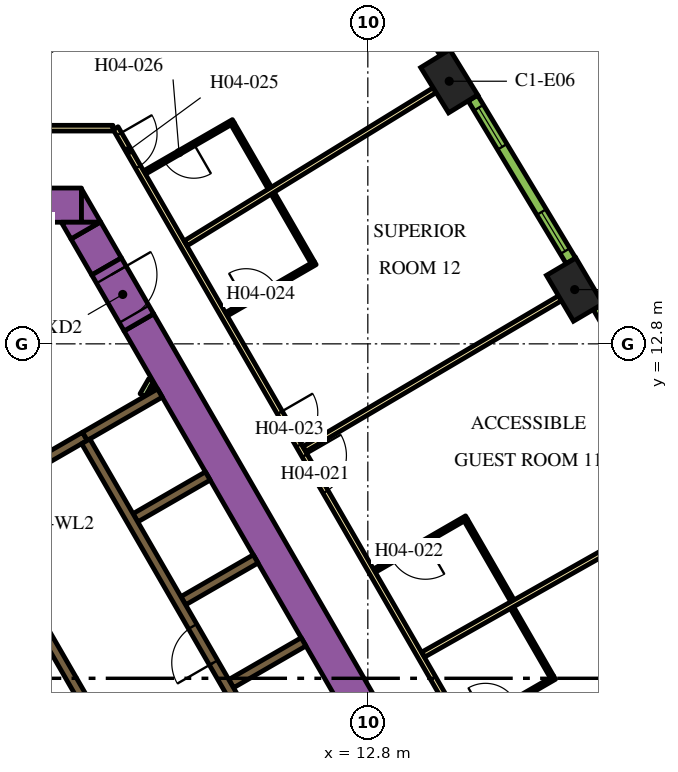
"""IFC4 building model, lengths in metres.
Left out: names, types, materials, properties, quantities, classifications, styles, units other than length and angle.
Written with IfcOpenShell. Run it as: python <this file> out.ifc"""

import sys

from ifc_helpers import new_model, si_unit, direction, frame, frame_2d, origin, origin_2d, place, context, subcontext, project, spatial, polyline, rectangle, outline, extrude, element, fill, save


model = new_model("IFC4")
c1 = context("Model", 3, precision=1e-05, world=origin(), true_north=direction((0.0, 1.0)))
c2 = subcontext(c1, "Body", "Model", "MODEL_VIEW")
j1 = project(units=[si_unit("LENGTHUNIT", "METRE"), si_unit("PLANEANGLEUNIT", "RADIAN")], contexts=[c1])
p1 = place(None, origin())
s1 = spatial("IfcSite", under=j1, at=p1, CompositionType="ELEMENT")
p2 = place(p1, origin())
s2 = spatial("IfcBuilding", under=s1, at=p2, CompositionType="ELEMENT")
p3 = place(p2, frame((0.0, 0.0, 62.7)))
s3 = spatial("IfcBuildingStorey", under=s2, at=p3, CompositionType="ELEMENT", Elevation=62.7)
for number, where, z_axis, x_axis in (
    (1, (18.243, 14.228, 0.0), (0.0, 0.0, 1.0), (-0.508, 0.861, 0.0)),
    (2, (14.942, 19.71, 0.0), (0.0, 0.0, 1.0), (-0.524, 0.852, 0.0)),
):
    element("IfcColumn", number, at=place(p3, frame(where, z_axis=z_axis, x_axis=x_axis)), inside=s3, PredefinedType="COLUMN", context=c2, shape_type="SweptSolid", body=[
        extrude(rectangle(XDim=1.4, YDim=0.9, at=origin_2d()), origin(), (0.0, 0.0, 1.0), 3.9),
    ])
p4 = place(p3, frame((6.776, 13.364, 0.0), z_axis=(0.0, 0.0, 1.0), x_axis=(0.500004177138, -0.8660229921, 0.0)))
e3 = element("IfcWall", 3, at=p4, inside=s3, PredefinedType="SOLIDWALL", context=c2, shape_type="SweptSolid", body=[
    extrude(rectangle(XDim=20.204, YDim=0.9, at=frame_2d((10.102, 0.0))), origin(), (0.0, 0.0, 1.0), 3.9),
])
p5 = place(p3, frame((-4.224, 16.45, 0.0), z_axis=(0.0, 0.0, 1.0), x_axis=(1.0, 0.0, 0.0)))
e4 = element("IfcWall", 4, at=p5, inside=s3, PredefinedType="SOLIDWALL", context=c2, shape_type="SweptSolid", body=[
    extrude(rectangle(XDim=9.488, YDim=0.9, at=frame_2d((4.744, 0.0))), origin(), (0.0, 0.0, 1.0), 3.9),
])
p6 = place(p3, origin())
e5 = element("IfcWall", 5, at=p6, inside=s3, PredefinedType="SOLIDWALL", context=c2, shape_type="SweptSolid", body=[
    extrude(outline(polyline([(5.265, 16.0), (5.265, 16.88), (5.773, 16.0), (5.265, 16.0)])), origin(), (0.0, 0.0, 1.0), 3.9),
])
p7 = place(p3, frame((5.926, 14.836, 0.0), z_axis=(0.0, 0.0, 1.0), x_axis=(-0.500076735116, 0.865981096212, 0.0)))
e6 = element("IfcWall", 6, at=p7, inside=s3, PredefinedType="SOLIDWALL", context=c2, shape_type="SweptSolid", body=[
    extrude(rectangle(XDim=1.094, YDim=0.9, at=frame_2d((0.547, 0.0))), origin(), (0.0, 0.0, 1.0), 3.9),
])
e7 = element("IfcWall", 7, at=p6, inside=s3, PredefinedType="SOLIDWALL", context=c2, shape_type="SweptSolid", body=[
    extrude(outline(polyline([(4.734, 16.0), (5.75, 16.0), (4.988, 15.56), (4.734, 16.0)])), origin(), (0.0, 0.0, 1.0), 3.9),
])
e8 = element("IfcWall", 8, at=p6, inside=s3, PredefinedType="SOLIDWALL", context=c2, shape_type="SweptSolid", body=[
    extrude(outline(polyline([(0.335, 6.925), (0.335, 6.925), (0.335, 7.075), (0.335, 7.075), (0.335, 7.075), (0.245, 7.075), (0.079, 7.363), (0.035, 7.439), (0.252, 7.564), (0.377, 7.348), (6.552, -3.348), (6.677, -3.564), (6.46, -3.689), (4.897, -0.981), (0.332, 6.925), (0.335, 6.925), (0.335, 6.925)])), origin(), (0.0, 0.0, 1.0), 3.9),
])
p8 = place(p3, frame((4.358, 9.791, 0.0), z_axis=(0.0, 0.0, 1.0), x_axis=(0.866079547155, 0.499906209203, 0.0)))
e9 = element("IfcWall", 9, at=p8, inside=s3, PredefinedType="SOLIDWALL", context=c2, shape_type="SweptSolid", body=[
    extrude(rectangle(XDim=1.15, YDim=0.25, at=frame_2d((0.575, 0.0))), origin(), (0.0, 0.0, 1.0), 3.9),
])
p9 = place(p3, frame((5.356, 10.367, 0.0), z_axis=(0.0, 0.0, 1.0), x_axis=(0.865978535641, 0.50008116922, 0.0)))
e10 = element("IfcWall", 10, at=p9, inside=s3, PredefinedType="SOLIDWALL", context=c2, shape_type="SweptSolid", body=[
    extrude(rectangle(XDim=2.278, YDim=0.25, at=frame_2d((1.139, 0.0))), origin(), (0.0, 0.0, 1.0), 3.9),
])
for number, where, z_axis, x_axis in (
    (11, (6.684, 8.224, 0.0), (0.0, 0.0, 1.0), (0.866, 0.5, 0.0)),
    (12, (7.944, 6.041, 0.0), (0.0, 0.0, 1.0), (0.866, 0.5, 0.0)),
    (13, (9.204, 3.859, 0.0), (0.0, 0.0, 1.0), (0.866, 0.5, 0.0)),
):
    element("IfcWall", number, at=place(p3, frame(where, z_axis=z_axis, x_axis=x_axis)), inside=s3, PredefinedType="SOLIDWALL", context=c2, shape_type="SweptSolid", body=[
        extrude(rectangle(XDim=2.2, YDim=0.25, at=frame_2d((1.1, 0.0))), origin(), (0.0, 0.0, 1.0), 3.9),
    ])
p10 = place(p3, frame((6.872, 11.45, 0.0), z_axis=(0.0, 0.0, 1.0), x_axis=(0.499846793097, 0.866113839764, 0.0)))
e14 = element("IfcWall", 14, at=p10, inside=s3, PredefinedType="PARTITIONING", context=c2, shape_type="SweptSolid", body=[
    extrude(rectangle(XDim=0.453, YDim=0.15, at=frame_2d((0.227, 0.0))), origin(), (0.0, 0.0, 1.0), 2.75),
])
p11 = place(p3, frame((7.131, 11.6, 0.0), z_axis=(0.0, 0.0, 1.0), x_axis=(0.498600033135, 0.866832167699, 0.0)))
e15 = element("IfcWall", 15, at=p11, inside=s3, PredefinedType="PARTITIONING", context=c2, shape_type="SweptSolid", body=[
    extrude(rectangle(XDim=0.107, YDim=0.15, at=frame_2d((0.053, 0.0))), origin(), (0.0, 0.0, 1.0), 2.75),
])
p12 = place(p3, frame((11.553, -0.46, 0.0), z_axis=(0.0, 0.0, 1.0), x_axis=(-0.500006514828, 0.866021642414, 0.0)))
e16 = element("IfcWall", 16, at=p12, inside=s3, PredefinedType="SOLIDWALL", context=c2, shape_type="SweptSolid", body=[
    extrude(rectangle(XDim=12.35, YDim=0.25, at=frame_2d((6.175, 0.0))), origin(), (0.0, 0.0, 1.0), 3.9),
])
p13 = place(p12, frame((0.585, 0.0, 0.0)))
e17 = element("IfcOpeningElement", 17, at=p13, cuts=e16, PredefinedType="OPENING", context=c2, shape_type="SweptSolid", body=[
    extrude(rectangle(XDim=1.1, YDim=2.1, at=frame_2d((0.55, 1.05))), frame((0.0, 0.135, 0.0), z_axis=(0.0, -1.0, 0.0), x_axis=(1.0, 0.0, 0.0)), (0.0, 0.0, 1.0), 0.27),
])
p14 = place(p12, frame((3.105, 0.0, 0.0)))
e18 = element("IfcOpeningElement", 18, at=p14, cuts=e16, PredefinedType="OPENING", context=c2, shape_type="SweptSolid", body=[
    extrude(rectangle(XDim=1.1, YDim=2.1, at=frame_2d((0.55, 1.05))), frame((0.0, 0.135, 0.0), z_axis=(0.0, -1.0, 0.0), x_axis=(1.0, 0.0, 0.0)), (0.0, 0.0, 1.0), 0.27),
])
p15 = place(p12, frame((5.625, 0.0, 0.0)))
e19 = element("IfcOpeningElement", 19, at=p15, cuts=e16, PredefinedType="OPENING", context=c2, shape_type="SweptSolid", body=[
    extrude(rectangle(XDim=1.1, YDim=2.1, at=frame_2d((0.55, 1.05))), frame((0.0, 0.135, 0.0), z_axis=(0.0, -1.0, 0.0), x_axis=(1.0, 0.0, 0.0)), (0.0, 0.0, 1.0), 0.27),
])
p16 = place(p3, frame((8.565, -2.185, 0.0), z_axis=(0.0, 0.0, 1.0), x_axis=(-0.499997954832, 0.866026584559, 0.0)))
e20 = element("IfcWall", 20, at=p16, inside=s3, PredefinedType="SOLIDWALL", context=c2, shape_type="SweptSolid", body=[
    extrude(rectangle(XDim=12.35, YDim=0.25, at=frame_2d((6.175, 0.0))), origin(), (0.0, 0.0, 1.0), 3.9),
])
p17 = place(p16, frame((5.725, 0.0, 0.0)))
e21 = element("IfcOpeningElement", 21, at=p17, cuts=e20, PredefinedType="OPENING", context=c2, shape_type="SweptSolid", body=[
    extrude(rectangle(XDim=0.9, YDim=2.1, at=frame_2d((0.45, 1.05))), frame((0.0, 0.135, 0.0), z_axis=(0.0, -1.0, 0.0), x_axis=(1.0, 0.0, 0.0)), (0.0, 0.0, 1.0), 0.27),
])
p18 = place(p3, frame((5.926, 14.836, 0.0), z_axis=(0.0, 0.0, 1.0), x_axis=(0.500062241894, -0.865989465428, 0.0)))
e22 = element("IfcWall", 22, at=p18, inside=s3, PredefinedType="SOLIDWALL", context=c2, shape_type="SweptSolid", body=[
    extrude(rectangle(XDim=1.7, YDim=0.9, at=frame_2d((0.85, 0.0))), origin(), (0.0, 0.0, 1.0), 3.9),
])
p19 = place(p18, frame((0.25, 0.0, 0.0)))
e23 = element("IfcOpeningElement", 23, at=p19, cuts=e22, PredefinedType="OPENING", context=c2, shape_type="SweptSolid", body=[
    extrude(rectangle(XDim=1.2, YDim=2.1, at=frame_2d((0.6, 1.05))), frame((0.0, 0.46, 0.0), z_axis=(0.0, -1.0, 0.0), x_axis=(1.0, 0.0, 0.0)), (0.0, 0.0, 1.0), 0.92),
])
p20 = place(p3, frame((6.163, 18.475, 0.0), z_axis=(0.0, 0.0, 1.0), x_axis=(0.500001317485, -0.866024643133, 0.0)))
e24 = element("IfcWall", 24, at=p20, inside=s3, PredefinedType="PARTITIONING", context=c2, shape_type="SweptSolid", body=[
    extrude(rectangle(XDim=25.767, YDim=0.15, at=frame_2d((12.883, 0.0))), origin(), (0.0, 0.0, 1.0), 2.75),
])
p21 = place(p20, frame((21.138, 0.0, 0.0)))
e25 = element("IfcOpeningElement", 25, at=p21, cuts=e24, PredefinedType="OPENING", context=c2, shape_type="SweptSolid", body=[
    extrude(rectangle(XDim=1.0, YDim=2.1, at=frame_2d((0.5, 1.05))), frame((0.0, 0.085, 0.0), z_axis=(0.0, -1.0, 0.0), x_axis=(1.0, 0.0, 0.0)), (0.0, 0.0, 1.0), 0.17),
])
p22 = place(p20, frame((9.948, 0.0, 0.0)))
e26 = element("IfcOpeningElement", 26, at=p22, cuts=e24, PredefinedType="OPENING", context=c2, shape_type="SweptSolid", body=[
    extrude(rectangle(XDim=1.1, YDim=2.1, at=frame_2d((0.55, 1.05))), frame((0.0, 0.085, 0.0), z_axis=(0.0, -1.0, 0.0), x_axis=(1.0, 0.0, 0.0)), (0.0, 0.0, 1.0), 0.17),
])
p23 = place(p20, frame((8.641, 0.0, 0.0)))
e27 = element("IfcOpeningElement", 27, at=p23, cuts=e24, PredefinedType="OPENING", context=c2, shape_type="SweptSolid", body=[
    extrude(rectangle(XDim=1.0, YDim=2.1, at=frame_2d((0.5, 1.05))), frame((0.0, 0.085, 0.0), z_axis=(0.0, -1.0, 0.0), x_axis=(1.0, 0.0, 0.0)), (0.0, 0.0, 1.0), 0.17),
])
p24 = place(p20, frame((0.18, 0.0, 0.0)))
e28 = element("IfcOpeningElement", 28, at=p24, cuts=e24, PredefinedType="OPENING", context=c2, shape_type="SweptSolid", body=[
    extrude(rectangle(XDim=1.0, YDim=2.1, at=frame_2d((0.5, 1.05))), frame((0.0, 0.085, 0.0), z_axis=(0.0, -1.0, 0.0), x_axis=(1.0, 0.0, 0.0)), (0.0, 0.0, 1.0), 0.17),
])
p25 = place(p3, frame((0.825, 18.475, 0.0), z_axis=(0.0, 0.0, 1.0), x_axis=(1.0, 0.0, 0.0)))
e29 = element("IfcWall", 29, at=p25, inside=s3, PredefinedType="PARTITIONING", context=c2, shape_type="SweptSolid", body=[
    extrude(rectangle(XDim=5.268, YDim=0.15, at=frame_2d((2.634, 0.0))), origin(), (0.0, 0.0, 1.0), 2.75),
])
p26 = place(p3, frame((11.16, 24.888, 0.0), z_axis=(0.0, 0.0, 1.0), x_axis=(-0.84199813156, -0.539480441211, 0.0)))
e30 = element("IfcWall", 30, at=p26, inside=s3, PredefinedType="PARTITIONING", context=c2, shape_type="SweptSolid", body=[
    extrude(rectangle(XDim=11.638, YDim=0.15, at=frame_2d((5.819, 0.0))), origin(), (0.0, 0.0, 1.0), 2.75),
])
p27 = place(p3, frame((14.558, 19.475, 0.0), z_axis=(0.0, 0.0, 1.0), x_axis=(-0.851829455142, -0.523819223925, 0.0)))
e31 = element("IfcWall", 31, at=p27, inside=s3, PredefinedType="PARTITIONING", context=c2, shape_type="SweptSolid", body=[
    extrude(rectangle(XDim=7.688, YDim=0.15, at=frame_2d((3.844, 0.0))), origin(), (0.0, 0.0, 1.0), 2.75),
])
p28 = place(p3, frame((17.856, 13.999, 0.0), z_axis=(0.0, 0.0, 1.0), x_axis=(-0.861371519381, -0.507975497047, 0.0)))
e32 = element("IfcWall", 32, at=p28, inside=s3, PredefinedType="PARTITIONING", context=c2, shape_type="SweptSolid", body=[
    extrude(rectangle(XDim=7.804, YDim=0.15, at=frame_2d((3.902, 0.0))), origin(), (0.0, 0.0, 1.0), 2.75),
])
p29 = place(p3, frame((21.052, 8.464, 0.0), z_axis=(0.0, 0.0, 1.0), x_axis=(-0.87059371954, -0.492002617368, 0.0)))
e33 = element("IfcWall", 33, at=p29, inside=s3, PredefinedType="PARTITIONING", context=c2, shape_type="SweptSolid", body=[
    extrude(rectangle(XDim=7.803, YDim=0.15, at=frame_2d((3.902, 0.0))), origin(), (0.0, 0.0, 1.0), 2.75),
])
p30 = place(p3, frame((15.376, 2.668, 0.0), z_axis=(0.0, 0.0, 1.0), x_axis=(0.866036505625, 0.499980770555, 0.0)))
e34 = element("IfcWall", 34, at=p30, inside=s3, PredefinedType="PARTITIONING", context=c2, shape_type="SweptSolid", body=[
    extrude(rectangle(XDim=2.7, YDim=0.1, at=frame_2d((1.35, 0.0))), origin(), (0.0, 0.0, 1.0), 2.75),
])
p31 = place(p30, frame((0.6, 0.0, 0.0)))
e35 = element("IfcOpeningElement", 35, at=p31, cuts=e34, PredefinedType="OPENING", context=c2, shape_type="SweptSolid", body=[
    extrude(rectangle(XDim=0.9, YDim=2.1, at=frame_2d((0.45, 1.05))), frame((0.0, 0.06, 0.0), z_axis=(0.0, -1.0, 0.0), x_axis=(1.0, 0.0, 0.0)), (0.0, 0.0, 1.0), 0.12),
])
p32 = place(p3, frame((17.646, 4.036, 0.0), z_axis=(0.0, 0.0, 1.0), x_axis=(-0.500027713859, 0.866009402589, 0.0)))
e36 = element("IfcWall", 36, at=p32, inside=s3, PredefinedType="PARTITIONING", context=c2, shape_type="SweptSolid", body=[
    extrude(rectangle(XDim=2.1, YDim=0.1, at=frame_2d((1.05, 0.0))), origin(), (0.0, 0.0, 1.0), 2.75),
])
p33 = place(p3, frame((15.397, 8.231, 0.0), z_axis=(0.0, 0.0, 1.0), x_axis=(-0.866018616679, -0.500011755427, 0.0)))
e37 = element("IfcWall", 37, at=p33, inside=s3, PredefinedType="PARTITIONING", context=c2, shape_type="SweptSolid", body=[
    extrude(rectangle(XDim=2.8, YDim=0.1, at=frame_2d((1.4, 0.0))), origin(), (0.0, 0.0, 1.0), 2.75),
])
p34 = place(p33, frame((1.25, 0.0, 0.0)))
e38 = element("IfcOpeningElement", 38, at=p34, cuts=e37, PredefinedType="OPENING", context=c2, shape_type="SweptSolid", body=[
    extrude(rectangle(XDim=1.0, YDim=2.1, at=frame_2d((0.5, 1.05))), frame((0.0, 0.06, 0.0), z_axis=(0.0, -1.0, 0.0), x_axis=(1.0, 0.0, 0.0)), (0.0, 0.0, 1.0), 0.12),
])
p35 = place(p3, frame((15.379, 8.163, 0.0), z_axis=(0.0, 0.0, 1.0), x_axis=(0.499987006516, -0.866032905446, 0.0)))
e39 = element("IfcWall", 39, at=p35, inside=s3, PredefinedType="PARTITIONING", context=c2, shape_type="SweptSolid", body=[
    extrude(rectangle(XDim=2.45, YDim=0.1, at=frame_2d((1.225, 0.0))), origin(), (0.0, 0.0, 1.0), 2.75),
])
p36 = place(p3, frame((9.077, 13.578, 0.0), z_axis=(0.0, 0.0, 1.0), x_axis=(0.866036505625, 0.499980770555, 0.0)))
e40 = element("IfcWall", 40, at=p36, inside=s3, PredefinedType="PARTITIONING", context=c2, shape_type="SweptSolid", body=[
    extrude(rectangle(XDim=2.7, YDim=0.1, at=frame_2d((1.35, 0.0))), origin(), (0.0, 0.0, 1.0), 2.75),
])
p37 = place(p36, frame((0.6, 0.0, 0.0)))
e41 = element("IfcOpeningElement", 41, at=p37, cuts=e40, PredefinedType="OPENING", context=c2, shape_type="SweptSolid", body=[
    extrude(rectangle(XDim=0.9, YDim=2.1, at=frame_2d((0.45, 1.05))), frame((0.0, 0.06, 0.0), z_axis=(0.0, -1.0, 0.0), x_axis=(1.0, 0.0, 0.0)), (0.0, 0.0, 1.0), 0.12),
])
p38 = place(p3, frame((11.342, 14.955, 0.0), z_axis=(0.0, 0.0, 1.0), x_axis=(-0.500008976872, 0.866020220923, 0.0)))
e42 = element("IfcWall", 42, at=p38, inside=s3, PredefinedType="PARTITIONING", context=c2, shape_type="SweptSolid", body=[
    extrude(rectangle(XDim=2.09, YDim=0.1, at=frame_2d((1.045, 0.0))), origin(), (0.0, 0.0, 1.0), 2.75),
])
p39 = place(p3, frame((9.262, 18.658, 0.0), z_axis=(0.0, 0.0, 1.0), x_axis=(-0.866019956843, -0.50000943426, 0.0)))
e43 = element("IfcWall", 43, at=p39, inside=s3, PredefinedType="PARTITIONING", context=c2, shape_type="SweptSolid", body=[
    extrude(rectangle(XDim=2.7, YDim=0.1, at=frame_2d((1.35, 0.0))), origin(), (0.0, 0.0, 1.0), 2.75),
])
p40 = place(p39, frame((1.2, 0.0, 0.0)))
e44 = element("IfcOpeningElement", 44, at=p40, cuts=e43, PredefinedType="OPENING", context=c2, shape_type="SweptSolid", body=[
    extrude(rectangle(XDim=0.9, YDim=2.1, at=frame_2d((0.45, 1.05))), frame((0.0, 0.06, 0.0), z_axis=(0.0, -1.0, 0.0), x_axis=(1.0, 0.0, 0.0)), (0.0, 0.0, 1.0), 0.12),
])
p41 = place(p3, frame((9.244, 18.589, 0.0), z_axis=(0.0, 0.0, 1.0), x_axis=(0.500043961785, -0.866000020948, 0.0)))
e45 = element("IfcWall", 45, at=p41, inside=s3, PredefinedType="PARTITIONING", context=c2, shape_type="SweptSolid", body=[
    extrude(rectangle(XDim=1.95, YDim=0.1, at=frame_2d((0.975, 0.0))), origin(), (0.0, 0.0, 1.0), 2.75),
])
p42 = place(p3, frame((21.357, 9.445, 0.0), z_axis=(0.0, 0.0, 1.0), x_axis=(-0.50002123722, 0.866013142123, 0.0)))
e46 = element("IfcWall", 46, at=p42, inside=s3, PredefinedType="SOLIDWALL", context=c2, shape_type="SweptSolid", body=[
    extrude(rectangle(XDim=4.998, YDim=0.29, at=frame_2d((2.499, 0.0))), origin(), (0.0, 0.0, 1.0), 3.65),
])
p43 = place(p42, frame((0.297, 0.0, 0.9)))
e47 = element("IfcOpeningElement", 47, at=p43, cuts=e46, PredefinedType="OPENING", context=c2, shape_type="SweptSolid", body=[
    extrude(rectangle(XDim=1.2, YDim=2.15, at=frame_2d((0.6, 1.075))), frame((0.0, 0.155, 0.0), z_axis=(0.0, -1.0, 0.0), x_axis=(1.0, 0.0, 0.0)), (0.0, 0.0, 1.0), 0.31),
])
p44 = place(p42, frame((3.501, 0.0, 0.9)))
e48 = element("IfcOpeningElement", 48, at=p44, cuts=e46, PredefinedType="OPENING", context=c2, shape_type="SweptSolid", body=[
    extrude(rectangle(XDim=1.2, YDim=2.15, at=frame_2d((0.6, 1.075))), frame((0.0, 0.155, 0.0), z_axis=(0.0, -1.0, 0.0), x_axis=(1.0, 0.0, 0.0)), (0.0, 0.0, 1.0), 0.31),
])
p45 = place(p3, frame((18.143, 14.986, 0.0), z_axis=(0.0, 0.0, 1.0), x_axis=(-0.515938796285, 0.856625448191, 0.0)))
e49 = element("IfcWall", 49, at=p45, inside=s3, PredefinedType="SOLIDWALL", context=c2, shape_type="SweptSolid", body=[
    extrude(rectangle(XDim=4.998, YDim=0.29, at=frame_2d((2.499, 0.0))), origin(), (0.0, 0.0, 1.0), 3.65),
])
p46 = place(p45, frame((0.297, 0.0, 0.9)))
e50 = element("IfcOpeningElement", 50, at=p46, cuts=e49, PredefinedType="OPENING", context=c2, shape_type="SweptSolid", body=[
    extrude(rectangle(XDim=1.2, YDim=2.15, at=frame_2d((0.6, 1.075))), frame((0.0, 0.155, 0.0), z_axis=(0.0, -1.0, 0.0), x_axis=(1.0, 0.0, 0.0)), (0.0, 0.0, 1.0), 0.31),
])
p47 = place(p45, frame((3.501, 0.0, 0.9)))
e51 = element("IfcOpeningElement", 51, at=p47, cuts=e49, PredefinedType="OPENING", context=c2, shape_type="SweptSolid", body=[
    extrude(rectangle(XDim=1.2, YDim=2.15, at=frame_2d((0.6, 1.075))), frame((0.0, 0.155, 0.0), z_axis=(0.0, -1.0, 0.0), x_axis=(1.0, 0.0, 0.0)), (0.0, 0.0, 1.0), 0.31),
])
p48 = place(p3, frame((14.827, 20.466, 0.0), z_axis=(0.0, 0.0, 1.0), x_axis=(-0.531688286542, 0.846940119462, 0.0)))
e52 = element("IfcWall", 52, at=p48, inside=s3, PredefinedType="SOLIDWALL", context=c2, shape_type="SweptSolid", body=[
    extrude(rectangle(XDim=4.998, YDim=0.29, at=frame_2d((2.499, 0.0))), origin(), (0.0, 0.0, 1.0), 3.65),
])
p49 = place(p48, frame((0.297, 0.0, 0.9)))
e53 = element("IfcOpeningElement", 53, at=p49, cuts=e52, PredefinedType="OPENING", context=c2, shape_type="SweptSolid", body=[
    extrude(rectangle(XDim=1.2, YDim=2.15, at=frame_2d((0.6, 1.075))), frame((0.0, 0.155, 0.0), z_axis=(0.0, -1.0, 0.0), x_axis=(1.0, 0.0, 0.0)), (0.0, 0.0, 1.0), 0.31),
])
p50 = place(p48, frame((3.501, 0.0, 0.9)))
e54 = element("IfcOpeningElement", 54, at=p50, cuts=e52, PredefinedType="OPENING", context=c2, shape_type="SweptSolid", body=[
    extrude(rectangle(XDim=1.2, YDim=2.15, at=frame_2d((0.6, 1.075))), frame((0.0, 0.155, 0.0), z_axis=(0.0, -1.0, 0.0), x_axis=(1.0, 0.0, 0.0)), (0.0, 0.0, 1.0), 0.31),
])
p51 = place(p15, origin())
e55 = element("IfcDoor", 55, at=p51, inside=s3, OperationType="DOUBLE_DOOR_SLIDING", PredefinedType="DOOR", context=c2, shape_type="SweptSolid", body=[
    extrude(rectangle(XDim=1.1, YDim=2.1, at=frame_2d((0.55, 1.05))), frame((0.0, 0.025, 0.0), z_axis=(0.0, -1.0, 0.0), x_axis=(1.0, 0.0, 0.0)), (0.0, 0.0, 1.0), 0.05),
])
fill(e19, e55)
p52 = place(p19, origin())
e56 = element("IfcDoor", 56, at=p52, inside=s3, OperationType="SINGLE_SWING_LEFT", PredefinedType="DOOR", context=c2, shape_type="SweptSolid", body=[
    extrude(rectangle(XDim=1.2, YDim=2.1, at=frame_2d((0.6, 1.05))), frame((0.0, 0.025, 0.0), z_axis=(0.0, -1.0, 0.0), x_axis=(1.0, 0.0, 0.0)), (0.0, 0.0, 1.0), 0.05),
])
fill(e23, e56)
p53 = place(p22, origin())
e57 = element("IfcDoor", 57, at=p53, inside=s3, OperationType="SINGLE_SWING_LEFT", PredefinedType="DOOR", context=c2, shape_type="SweptSolid", body=[
    extrude(rectangle(XDim=1.1, YDim=2.1, at=frame_2d((0.55, 1.05))), frame((0.0, 0.025, 0.0), z_axis=(0.0, -1.0, 0.0), x_axis=(1.0, 0.0, 0.0)), (0.0, 0.0, 1.0), 0.05),
])
fill(e26, e57)
p54 = place(p34, origin())
e58 = element("IfcDoor", 58, at=p54, inside=s3, OperationType="SINGLE_SWING_LEFT", PredefinedType="DOOR", context=c2, shape_type="SweptSolid", body=[
    extrude(rectangle(XDim=1.0, YDim=2.1, at=frame_2d((0.5, 1.05))), frame((0.0, 0.025, 0.0), z_axis=(0.0, -1.0, 0.0), x_axis=(1.0, 0.0, 0.0)), (0.0, 0.0, 1.0), 0.05),
])
fill(e38, e58)
p55 = place(p23, origin())
e59 = element("IfcDoor", 59, at=p55, inside=s3, OperationType="SINGLE_SWING_RIGHT", PredefinedType="DOOR", context=c2, shape_type="SweptSolid", body=[
    extrude(rectangle(XDim=1.0, YDim=2.1, at=frame_2d((0.5, 1.05))), frame((0.0, 0.025, 0.0), z_axis=(0.0, -1.0, 0.0), x_axis=(1.0, 0.0, 0.0)), (0.0, 0.0, 1.0), 0.05),
])
fill(e27, e59)
p56 = place(p37, origin())
e60 = element("IfcDoor", 60, at=p56, inside=s3, OperationType="SINGLE_SWING_RIGHT", PredefinedType="DOOR", context=c2, shape_type="SweptSolid", body=[
    extrude(rectangle(XDim=0.9, YDim=2.1, at=frame_2d((0.45, 1.05))), frame((0.0, 0.025, 0.0), z_axis=(0.0, -1.0, 0.0), x_axis=(1.0, 0.0, 0.0)), (0.0, 0.0, 1.0), 0.05),
])
fill(e41, e60)
p57 = place(p24, origin())
e61 = element("IfcDoor", 61, at=p57, inside=s3, OperationType="SINGLE_SWING_LEFT", PredefinedType="DOOR", context=c2, shape_type="SweptSolid", body=[
    extrude(rectangle(XDim=1.0, YDim=2.1, at=frame_2d((0.5, 1.05))), frame((0.0, 0.025, 0.0), z_axis=(0.0, -1.0, 0.0), x_axis=(1.0, 0.0, 0.0)), (0.0, 0.0, 1.0), 0.05),
])
fill(e28, e61)
p58 = place(p40, origin())
e62 = element("IfcDoor", 62, at=p58, inside=s3, OperationType="SINGLE_SWING_LEFT", PredefinedType="DOOR", context=c2, shape_type="SweptSolid", body=[
    extrude(rectangle(XDim=0.9, YDim=2.1, at=frame_2d((0.45, 1.05))), frame((0.0, 0.025, 0.0), z_axis=(0.0, -1.0, 0.0), x_axis=(1.0, 0.0, 0.0)), (0.0, 0.0, 1.0), 0.05),
])
fill(e44, e62)
p59 = place(p46, origin())
e63 = element("IfcWindow", 63, at=p59, inside=s3, PartitioningType="DOUBLE_PANEL_VERTICAL", PredefinedType="WINDOW", context=c2, shape_type="SweptSolid", body=[
    extrude(rectangle(XDim=1.2, YDim=2.15, at=frame_2d((0.6, 1.075))), frame((0.0, 0.015, 0.0), z_axis=(0.0, -1.0, 0.0), x_axis=(1.0, 0.0, 0.0)), (0.0, 0.0, 1.0), 0.06),
])
fill(e50, e63)
p60 = place(p47, origin())
e64 = element("IfcWindow", 64, at=p60, inside=s3, PartitioningType="DOUBLE_PANEL_VERTICAL", PredefinedType="WINDOW", context=c2, shape_type="SweptSolid", body=[
    extrude(rectangle(XDim=1.2, YDim=2.15, at=frame_2d((0.6, 1.075))), frame((0.0, 0.015, 0.0), z_axis=(0.0, -1.0, 0.0), x_axis=(1.0, 0.0, 0.0)), (0.0, 0.0, 1.0), 0.06),
])
fill(e51, e64)
save(model, sys.argv[1])
